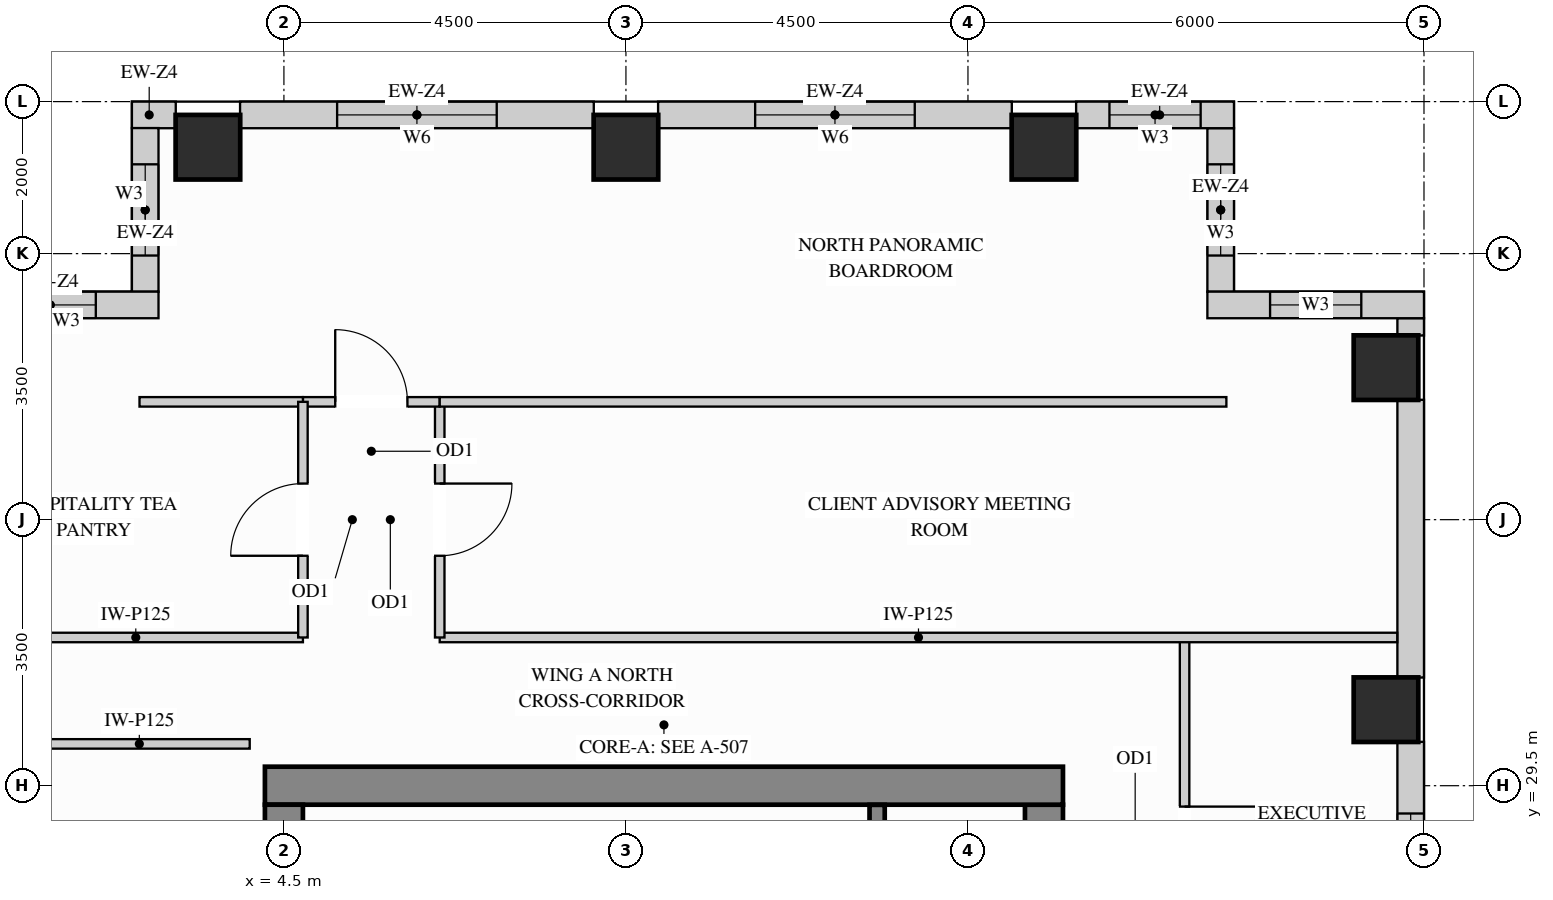
"""IFC4 building model, lengths in metres.
Left out: names, types, materials, properties, quantities, classifications, styles, units other than length and angle.
Written with IfcOpenShell. Run it as: python <this file> out.ifc"""

import sys

from ifc_helpers import new_model, si_unit, direction, frame, frame_2d, origin, origin_2d, place, context, subcontext, project, spatial, rectangle, extrude, source, transform, mapped, element, fill, save


model = new_model("IFC4")
c1 = context("Model", 3, precision=1e-05, world=origin(), true_north=direction((0.0, 1.0)))
c2 = subcontext(c1, "Body", "Model", "MODEL_VIEW")
j1 = project(units=[si_unit("LENGTHUNIT", "METRE"), si_unit("PLANEANGLEUNIT", "RADIAN")], contexts=[c1])
p1 = place(None, origin())
s1 = spatial("IfcSite", under=j1, at=p1, CompositionType="ELEMENT")
p2 = place(p1, origin())
s2 = spatial("IfcBuilding", under=s1, at=p2, CompositionType="ELEMENT")
p3 = place(p2, frame((0.0, 0.0, 262.8)))
s3 = spatial("IfcBuildingStorey", under=s2, at=p3, CompositionType="ELEMENT", Elevation=262.8)
m1 = source(origin(), c2, "Body", "SweptSolid", [
    extrude(rectangle(XDim=0.85, YDim=0.85, at=origin_2d()), origin(), (0.0, 0.0, 1.0), 3.4),
])
for number, where, z_axis, x_axis in (
    (1, (19.0, 30.5, 0.0), (0.0, 0.0, 1.0), (1.0, 0.0, 0.0)),
    (2, (19.0, 35.0, 0.0), (0.0, 0.0, 1.0), (1.0, 0.0, 0.0)),
    (3, (14.5, 37.9, 0.0), (0.0, 0.0, 1.0), (1.0, 0.0, 0.0)),
    (4, (3.5, 37.9, 0.0), (0.0, 0.0, 1.0), (1.0, 0.0, 0.0)),
    (5, (9.0, 37.9, 0.0), (0.0, 0.0, 1.0), (1.0, 0.0, 0.0)),
):
    element("IfcColumn", number, at=place(p3, frame(where, z_axis=z_axis, x_axis=x_axis)), inside=s3, PredefinedType="COLUMN", context=c2, shape_type="MappedRepresentation", body=[
        mapped(m1, transform((0.0, 0.0, 0.0), x_axis=(1.0, 0.0, 0.0), y_axis=(0.0, 1.0, 0.0), z_axis=(0.0, 0.0, 1.0))),
    ])
m2 = source(origin(), c2, "Body", "SweptSolid", [
    extrude(rectangle(XDim=8.37, YDim=0.5, at=frame_2d((4.185, 0.0))), origin(), (0.0, 0.0, 1.0), 3.4),
])
p4 = place(p3, frame((14.5, 20.88, 0.0), z_axis=(0.0, 0.0, 1.0), x_axis=(0.0, 1.0, 0.0)))
e6 = element("IfcWall", 6, at=p4, inside=s3, PredefinedType="SHEAR", context=c2, shape_type="MappedRepresentation", body=[
    mapped(m2, transform((0.0, 0.0, 0.0), x_axis=(1.0, 0.0, 0.0), y_axis=(0.0, 1.0, 0.0), z_axis=(0.0, 0.0, 1.0))),
])
m3 = source(origin(), c2, "Body", "SweptSolid", [
    extrude(rectangle(XDim=10.5, YDim=0.5, at=frame_2d((5.25, 0.0))), origin(), (0.0, 0.0, 1.0), 3.4),
])
p5 = place(p3, frame((4.25, 29.5, 0.0), z_axis=(0.0, 0.0, 1.0), x_axis=(1.0, 0.0, 0.0)))
e7 = element("IfcWall", 7, at=p5, inside=s3, PredefinedType="SHEAR", context=c2, shape_type="MappedRepresentation", body=[
    mapped(m3, transform((0.0, 0.0, 0.0), x_axis=(1.0, 0.0, 0.0), y_axis=(0.0, 1.0, 0.0), z_axis=(0.0, 0.0, 1.0))),
])
m4 = source(origin(), c2, "Body", "SweptSolid", [
    extrude(rectangle(XDim=20.5, YDim=0.5, at=frame_2d((10.25, 0.0))), origin(), (0.0, 0.0, 1.0), 3.4),
])
p6 = place(p3, frame((4.5, 8.75, 0.0), z_axis=(0.0, 0.0, 1.0), x_axis=(0.0, 1.0, 0.0)))
e8 = element("IfcWall", 8, at=p6, inside=s3, PredefinedType="SHEAR", context=c2, shape_type="MappedRepresentation", body=[
    mapped(m4, transform((0.0, 0.0, 0.0), x_axis=(1.0, 0.0, 0.0), y_axis=(0.0, 1.0, 0.0), z_axis=(0.0, 0.0, 1.0))),
])
p7 = place(p3, frame((16.825, 35.998, 0.0), z_axis=(0.0, 0.0, 1.0), x_axis=(0.0, 1.0, 0.0)))
e9 = element("IfcWall", 9, at=p7, inside=s3, PredefinedType="SOLIDWALL", context=c2, shape_type="SweptSolid", body=[
    extrude(rectangle(XDim=2.154, YDim=0.35, at=frame_2d((1.077, 0.0))), origin(), (0.0, 0.0, 1.0), 3.385),
])
p8 = place(p7, frame((0.477, 0.0, 0.78)))
e10 = element("IfcOpeningElement", 10, at=p8, cuts=e9, PredefinedType="OPENING", context=c2, shape_type="SweptSolid", body=[
    extrude(rectangle(XDim=1.2, YDim=2.25, at=frame_2d((0.6, 1.125))), frame((0.0, 0.185, 0.0), z_axis=(0.0, -1.0, 0.0), x_axis=(1.0, 0.0, 0.0)), (0.0, 0.0, 1.0), 0.37),
])
p9 = place(p3, frame((17.0, 38.325, 0.0), z_axis=(0.0, 0.0, 1.0), x_axis=(-1.0, 0.0, 0.0)))
e11 = element("IfcWall", 11, at=p9, inside=s3, PredefinedType="SOLIDWALL", context=c2, shape_type="SweptSolid", body=[
    extrude(rectangle(XDim=2.077, YDim=0.35, at=frame_2d((1.039, 0.0))), origin(), (0.0, 0.0, 1.0), 3.385),
])
p10 = place(p9, frame((0.438, 0.0, 0.78)))
e12 = element("IfcOpeningElement", 12, at=p10, cuts=e11, PredefinedType="OPENING", context=c2, shape_type="SweptSolid", body=[
    extrude(rectangle(XDim=1.2, YDim=2.25, at=frame_2d((0.6, 1.125))), frame((0.0, 0.185, 0.0), z_axis=(0.0, -1.0, 0.0), x_axis=(1.0, 0.0, 0.0)), (0.0, 0.0, 1.0), 0.37),
])
p11 = place(p3, frame((14.077, 38.325, 0.0), z_axis=(0.0, 0.0, 1.0), x_axis=(-1.0, 0.0, 0.0)))
e13 = element("IfcWall", 13, at=p11, inside=s3, PredefinedType="SOLIDWALL", context=c2, shape_type="SweptSolid", body=[
    extrude(rectangle(XDim=4.654, YDim=0.35, at=frame_2d((2.327, 0.0))), origin(), (0.0, 0.0, 1.0), 3.385),
])
p12 = place(p11, frame((1.277, 0.0, 0.78)))
e14 = element("IfcOpeningElement", 14, at=p12, cuts=e13, PredefinedType="OPENING", context=c2, shape_type="SweptSolid", body=[
    extrude(rectangle(XDim=2.1, YDim=2.25, at=frame_2d((1.05, 1.125))), frame((0.0, 0.185, 0.0), z_axis=(0.0, -1.0, 0.0), x_axis=(1.0, 0.0, 0.0)), (0.0, 0.0, 1.0), 0.37),
])
p13 = place(p3, frame((8.577, 38.325, 0.0), z_axis=(0.0, 0.0, 1.0), x_axis=(-1.0, 0.0, 0.0)))
e15 = element("IfcWall", 15, at=p13, inside=s3, PredefinedType="SOLIDWALL", context=c2, shape_type="SweptSolid", body=[
    extrude(rectangle(XDim=4.654, YDim=0.35, at=frame_2d((2.327, 0.0))), origin(), (0.0, 0.0, 1.0), 3.385),
])
p14 = place(p13, frame((1.277, 0.0, 0.78)))
e16 = element("IfcOpeningElement", 16, at=p14, cuts=e15, PredefinedType="OPENING", context=c2, shape_type="SweptSolid", body=[
    extrude(rectangle(XDim=2.1, YDim=2.25, at=frame_2d((1.05, 1.125))), frame((0.0, 0.185, 0.0), z_axis=(0.0, -1.0, 0.0), x_axis=(1.0, 0.0, 0.0)), (0.0, 0.0, 1.0), 0.37),
])
m5 = source(origin(), c2, "Body", "SweptSolid", [
    extrude(rectangle(XDim=0.577, YDim=0.35, at=frame_2d((0.289, 0.0))), origin(), (0.0, 0.0, 1.0), 3.385),
])
p15 = place(p3, frame((3.077, 38.325, 0.0), z_axis=(0.0, 0.0, 1.0), x_axis=(-1.0, 0.0, 0.0)))
e17 = element("IfcWall", 17, at=p15, inside=s3, PredefinedType="SOLIDWALL", context=c2, shape_type="MappedRepresentation", body=[
    mapped(m5, transform((0.0, 0.0, 0.0), x_axis=(1.0, 0.0, 0.0), y_axis=(0.0, 1.0, 0.0), z_axis=(0.0, 0.0, 1.0))),
])
p16 = place(p3, frame((2.675, 38.152, 0.0), z_axis=(0.0, 0.0, 1.0), x_axis=(0.0, -1.0, 0.0)))
e18 = element("IfcWall", 18, at=p16, inside=s3, PredefinedType="SOLIDWALL", context=c2, shape_type="SweptSolid", body=[
    extrude(rectangle(XDim=2.154, YDim=0.35, at=frame_2d((1.077, 0.0))), origin(), (0.0, 0.0, 1.0), 3.385),
])
p17 = place(p16, frame((0.477, 0.0, 0.78)))
e19 = element("IfcOpeningElement", 19, at=p17, cuts=e18, PredefinedType="OPENING", context=c2, shape_type="SweptSolid", body=[
    extrude(rectangle(XDim=1.2, YDim=2.25, at=frame_2d((0.6, 1.125))), frame((0.0, 0.185, 0.0), z_axis=(0.0, -1.0, 0.0), x_axis=(1.0, 0.0, 0.0)), (0.0, 0.0, 1.0), 0.37),
])
p18 = place(p3, frame((2.85, 35.825, 0.0), z_axis=(0.0, 0.0, 1.0), x_axis=(-1.0, 0.0, 0.0)))
e20 = element("IfcWall", 20, at=p18, inside=s3, PredefinedType="SOLIDWALL", context=c2, shape_type="SweptSolid", body=[
    extrude(rectangle(XDim=2.85, YDim=0.35, at=frame_2d((1.425, 0.0))), origin(), (0.0, 0.0, 1.0), 3.385),
])
p19 = place(p18, frame((0.825, 0.0, 0.78)))
e21 = element("IfcOpeningElement", 21, at=p19, cuts=e20, PredefinedType="OPENING", context=c2, shape_type="SweptSolid", body=[
    extrude(rectangle(XDim=1.2, YDim=2.25, at=frame_2d((0.6, 1.125))), frame((0.0, 0.185, 0.0), z_axis=(0.0, -1.0, 0.0), x_axis=(1.0, 0.0, 0.0)), (0.0, 0.0, 1.0), 0.37),
])
p20 = place(p3, frame((19.325, 27.223, 0.0), z_axis=(0.0, 0.0, 1.0), x_axis=(0.0, 1.0, 0.0)))
e22 = element("IfcWall", 22, at=p20, inside=s3, PredefinedType="SOLIDWALL", context=c2, shape_type="SweptSolid", body=[
    extrude(rectangle(XDim=2.854, YDim=0.35, at=frame_2d((1.427, 0.0))), origin(), (0.0, 0.0, 1.0), 2.619),
])
p21 = place(p20, frame((0.411, 0.0, 0.78)))
e23 = element("IfcOpeningElement", 23, at=p21, cuts=e22, PredefinedType="OPENING", context=c2, shape_type="SweptSolid", body=[
    extrude(rectangle(XDim=1.5, YDim=1.659, at=frame_2d((0.75, 0.83))), frame((0.0, 0.185, 0.0), z_axis=(0.0, -1.0, 0.0), x_axis=(1.0, 0.0, 0.0)), (0.0, 0.0, 1.0), 0.37),
])
m6 = source(origin(), c2, "Body", "SweptSolid", [
    extrude(rectangle(XDim=3.654, YDim=0.35, at=frame_2d((1.827, 0.0))), origin(), (0.0, 0.0, 1.0), 2.619),
])
p22 = place(p3, frame((19.325, 30.923, 0.0), z_axis=(0.0, 0.0, 1.0), x_axis=(0.0, 1.0, 0.0)))
e24 = element("IfcWall", 24, at=p22, inside=s3, PredefinedType="SOLIDWALL", context=c2, shape_type="MappedRepresentation", body=[
    mapped(m6, transform((0.0, 0.0, 0.0), x_axis=(1.0, 0.0, 0.0), y_axis=(0.0, 1.0, 0.0), z_axis=(0.0, 0.0, 1.0))),
])
m7 = source(origin(), c2, "Body", "SweptSolid", [
    extrude(rectangle(XDim=0.229, YDim=0.35, at=frame_2d((0.115, 0.0))), origin(), (0.0, 0.0, 1.0), 3.385),
])
p23 = place(p3, frame((19.325, 35.423, 0.0), z_axis=(0.0, 0.0, 1.0), x_axis=(0.0, 1.0, 0.0)))
e25 = element("IfcWall", 25, at=p23, inside=s3, PredefinedType="SOLIDWALL", context=c2, shape_type="MappedRepresentation", body=[
    mapped(m7, transform((0.0, 0.0, 0.0), x_axis=(1.0, 0.0, 0.0), y_axis=(0.0, 1.0, 0.0), z_axis=(0.0, 0.0, 1.0))),
])
p24 = place(p3, frame((19.5, 35.825, 0.0), z_axis=(0.0, 0.0, 1.0), x_axis=(-1.0, 0.0, 0.0)))
e26 = element("IfcWall", 26, at=p24, inside=s3, PredefinedType="SOLIDWALL", context=c2, shape_type="SweptSolid", body=[
    extrude(rectangle(XDim=2.85, YDim=0.35, at=frame_2d((1.425, 0.0))), origin(), (0.0, 0.0, 1.0), 3.385),
])
p25 = place(p24, frame((0.825, 0.0, 0.78)))
e27 = element("IfcOpeningElement", 27, at=p25, cuts=e26, PredefinedType="OPENING", context=c2, shape_type="SweptSolid", body=[
    extrude(rectangle(XDim=1.2, YDim=2.25, at=frame_2d((0.6, 1.125))), frame((0.0, 0.185, 0.0), z_axis=(0.0, -1.0, 0.0), x_axis=(1.0, 0.0, 0.0)), (0.0, 0.0, 1.0), 0.37),
])
p26 = place(p3, frame((16.35, 26.05, 0.0), z_axis=(0.0, 0.0, 1.0), x_axis=(0.0, 1.0, 0.0)))
e28 = element("IfcWall", 28, at=p26, inside=s3, PredefinedType="PARTITIONING", context=c2, shape_type="SweptSolid", body=[
    extrude(rectangle(XDim=5.4, YDim=0.125, at=frame_2d((2.7, 0.0))), origin(), (0.0, 0.0, 1.0), 3.385),
])
p27 = place(p26, frame((2.225, 0.0, 0.0)))
e29 = element("IfcOpeningElement", 29, at=p27, cuts=e28, PredefinedType="OPENING", context=c2, shape_type="SweptSolid", body=[
    extrude(rectangle(XDim=0.95, YDim=2.15, at=frame_2d((0.475, 1.075))), frame((0.0, 0.073, 0.0), z_axis=(0.0, -1.0, 0.0), x_axis=(1.0, 0.0, 0.0)), (0.0, 0.0, 1.0), 0.145),
])
m8 = source(origin(), c2, "Body", "SweptSolid", [
    extrude(rectangle(XDim=12.598, YDim=0.125, at=frame_2d((6.299, 0.0))), origin(), (0.0, 0.0, 1.0), 3.385),
])
p28 = place(p3, frame((6.55, 31.45, 0.0), z_axis=(0.0, 0.0, 1.0), x_axis=(1.0, 0.0, 0.0)))
e30 = element("IfcWall", 30, at=p28, inside=s3, PredefinedType="PARTITIONING", context=c2, shape_type="MappedRepresentation", body=[
    mapped(m8, transform((0.0, 0.0, 0.0), x_axis=(1.0, 0.0, 0.0), y_axis=(0.0, 1.0, 0.0), z_axis=(0.0, 0.0, 1.0))),
])
m9 = source(origin(), c2, "Body", "SweptSolid", [
    extrude(rectangle(XDim=4.398, YDim=0.125, at=frame_2d((2.199, 0.0))), origin(), (0.0, 0.0, 1.0), 3.385),
])
p29 = place(p3, frame((0.352, 31.45, 0.0), z_axis=(0.0, 0.0, 1.0), x_axis=(1.0, 0.0, 0.0)))
e31 = element("IfcWall", 31, at=p29, inside=s3, PredefinedType="PARTITIONING", context=c2, shape_type="MappedRepresentation", body=[
    mapped(m9, transform((0.0, 0.0, 0.0), x_axis=(1.0, 0.0, 0.0), y_axis=(0.0, 1.0, 0.0), z_axis=(0.0, 0.0, 1.0))),
])
m10 = source(origin(), c2, "Body", "SweptSolid", [
    extrude(rectangle(XDim=3.0, YDim=0.125, at=frame_2d((1.5, 0.0))), origin(), (0.0, 0.0, 1.0), 3.385),
])
p30 = place(p3, frame((1.05, 30.05, 0.0), z_axis=(0.0, 0.0, 1.0), x_axis=(1.0, 0.0, 0.0)))
e32 = element("IfcWall", 32, at=p30, inside=s3, PredefinedType="PARTITIONING", context=c2, shape_type="MappedRepresentation", body=[
    mapped(m10, transform((0.0, 0.0, 0.0), x_axis=(1.0, 0.0, 0.0), y_axis=(0.0, 1.0, 0.0), z_axis=(0.0, 0.0, 1.0))),
])
p31 = place(p3, frame((6.55, 31.45, 0.0), z_axis=(0.0, 0.0, 1.0), x_axis=(0.0, 1.0, 0.0)))
e33 = element("IfcWall", 33, at=p31, inside=s3, PredefinedType="PARTITIONING", context=c2, shape_type="SweptSolid", body=[
    extrude(rectangle(XDim=3.1, YDim=0.125, at=frame_2d((1.55, 0.0))), origin(), (0.0, 0.0, 1.0), 3.385),
])
p32 = place(p31, frame((1.075, 0.0, 0.0)))
e34 = element("IfcOpeningElement", 34, at=p32, cuts=e33, PredefinedType="OPENING", context=c2, shape_type="SweptSolid", body=[
    extrude(rectangle(XDim=0.95, YDim=2.15, at=frame_2d((0.475, 1.075))), frame((0.0, 0.073, 0.0), z_axis=(0.0, -1.0, 0.0), x_axis=(1.0, 0.0, 0.0)), (0.0, 0.0, 1.0), 0.145),
])
p33 = place(p3, frame((4.75, 34.55, 0.0), z_axis=(0.0, 0.0, 1.0), x_axis=(1.0, 0.0, 0.0)))
e35 = element("IfcWall", 35, at=p33, inside=s3, PredefinedType="PARTITIONING", context=c2, shape_type="SweptSolid", body=[
    extrude(rectangle(XDim=1.8, YDim=0.125, at=frame_2d((0.9, 0.0))), origin(), (0.0, 0.0, 1.0), 3.385),
])
p34 = place(p33, frame((0.425, 0.0, 0.0)))
e36 = element("IfcOpeningElement", 36, at=p34, cuts=e35, PredefinedType="OPENING", context=c2, shape_type="SweptSolid", body=[
    extrude(rectangle(XDim=0.95, YDim=2.15, at=frame_2d((0.475, 1.075))), frame((0.0, 0.073, 0.0), z_axis=(0.0, -1.0, 0.0), x_axis=(1.0, 0.0, 0.0)), (0.0, 0.0, 1.0), 0.145),
])
m11 = source(origin(), c2, "Body", "SweptSolid", [
    extrude(rectangle(XDim=10.35, YDim=0.125, at=frame_2d((5.175, 0.0))), origin(), (0.0, 0.0, 1.0), 3.385),
])
p35 = place(p3, frame((6.55, 34.55, 0.0), z_axis=(0.0, 0.0, 1.0), x_axis=(1.0, 0.0, 0.0)))
e37 = element("IfcWall", 37, at=p35, inside=s3, PredefinedType="PARTITIONING", context=c2, shape_type="MappedRepresentation", body=[
    mapped(m11, transform((0.0, 0.0, 0.0), x_axis=(1.0, 0.0, 0.0), y_axis=(0.0, 1.0, 0.0), z_axis=(0.0, 0.0, 1.0))),
])
m12 = source(origin(), c2, "Body", "SweptSolid", [
    extrude(rectangle(XDim=2.15, YDim=0.125, at=frame_2d((1.075, 0.0))), origin(), (0.0, 0.0, 1.0), 3.385),
])
p36 = place(p3, frame((2.6, 34.55, 0.0), z_axis=(0.0, 0.0, 1.0), x_axis=(1.0, 0.0, 0.0)))
e38 = element("IfcWall", 38, at=p36, inside=s3, PredefinedType="PARTITIONING", context=c2, shape_type="MappedRepresentation", body=[
    mapped(m12, transform((0.0, 0.0, 0.0), x_axis=(1.0, 0.0, 0.0), y_axis=(0.0, 1.0, 0.0), z_axis=(0.0, 0.0, 1.0))),
])
p37 = place(p3, frame((4.75, 31.45, 0.0), z_axis=(0.0, 0.0, 1.0), x_axis=(0.0, 1.0, 0.0)))
e39 = element("IfcWall", 39, at=p37, inside=s3, PredefinedType="PARTITIONING", context=c2, shape_type="SweptSolid", body=[
    extrude(rectangle(XDim=3.1, YDim=0.125, at=frame_2d((1.55, 0.0))), origin(), (0.0, 0.0, 1.0), 3.385),
])
p38 = place(p37, frame((1.075, 0.0, 0.0)))
e40 = element("IfcOpeningElement", 40, at=p38, cuts=e39, PredefinedType="OPENING", context=c2, shape_type="SweptSolid", body=[
    extrude(rectangle(XDim=0.95, YDim=2.15, at=frame_2d((0.475, 1.075))), frame((0.0, 0.073, 0.0), z_axis=(0.0, -1.0, 0.0), x_axis=(1.0, 0.0, 0.0)), (0.0, 0.0, 1.0), 0.145),
])
m13 = source(origin(), c2, "Body", "SweptSolid", [
    extrude(rectangle(XDim=3.803, YDim=0.2, at=frame_2d((1.901, 0.0))), origin(), (0.0, 0.0, 1.0), 3.4),
])
p39 = place(p3, frame((12.305, 25.445, 0.0), z_axis=(0.0, 0.0, 1.0), x_axis=(0.0, 1.0, 0.0)))
e41 = element("IfcWall", 41, at=p39, inside=s3, PredefinedType="SHEAR", context=c2, shape_type="MappedRepresentation", body=[
    mapped(m13, transform((0.0, 0.0, 0.0), x_axis=(1.0, 0.0, 0.0), y_axis=(0.0, 1.0, 0.0), z_axis=(0.0, 0.0, 1.0))),
])
m14 = source(origin(), c2, "Body", "SweptSolid", [
    extrude(rectangle(XDim=0.95, YDim=2.15, at=frame_2d((0.475, 1.075))), frame((0.0, 0.025, 0.0), z_axis=(0.0, -1.0, 0.0), x_axis=(1.0, 0.0, 0.0)), (0.0, 0.0, 1.0), 0.05),
])
p40 = place(p27, origin())
e42 = element("IfcDoor", 42, at=p40, inside=s3, OperationType="SINGLE_SWING_RIGHT", PredefinedType="DOOR", context=c2, shape_type="MappedRepresentation", body=[
    mapped(m14, transform((0.0, 0.0, 0.0), x_axis=(1.0, 0.0, 0.0), y_axis=(0.0, 1.0, 0.0), z_axis=(0.0, 0.0, 1.0))),
])
fill(e29, e42)
p41 = place(p32, origin())
e43 = element("IfcDoor", 43, at=p41, inside=s3, OperationType="SINGLE_SWING_RIGHT", PredefinedType="DOOR", context=c2, shape_type="MappedRepresentation", body=[
    mapped(m14, transform((0.0, 0.0, 0.0), x_axis=(1.0, 0.0, 0.0), y_axis=(0.0, 1.0, 0.0), z_axis=(0.0, 0.0, 1.0))),
])
fill(e34, e43)
p42 = place(p34, origin())
e44 = element("IfcDoor", 44, at=p42, inside=s3, OperationType="SINGLE_SWING_LEFT", PredefinedType="DOOR", context=c2, shape_type="MappedRepresentation", body=[
    mapped(m14, transform((0.0, 0.0, 0.0), x_axis=(1.0, 0.0, 0.0), y_axis=(0.0, 1.0, 0.0), z_axis=(0.0, 0.0, 1.0))),
])
fill(e36, e44)
p43 = place(p38, origin())
e45 = element("IfcDoor", 45, at=p43, inside=s3, OperationType="SINGLE_SWING_LEFT", PredefinedType="DOOR", context=c2, shape_type="MappedRepresentation", body=[
    mapped(m14, transform((0.0, 0.0, 0.0), x_axis=(1.0, 0.0, 0.0), y_axis=(0.0, 1.0, 0.0), z_axis=(0.0, 0.0, 1.0))),
])
fill(e40, e45)
m15 = source(origin(), c2, "Body", "SweptSolid", [
    extrude(rectangle(XDim=1.2, YDim=2.25, at=frame_2d((0.6, 1.125))), frame((0.0, 0.03, 0.0), z_axis=(0.0, -1.0, 0.0), x_axis=(1.0, 0.0, 0.0)), (0.0, 0.0, 1.0), 0.06),
])
p44 = place(p8, origin())
e46 = element("IfcWindow", 46, at=p44, inside=s3, PartitioningType="SINGLE_PANEL", PredefinedType="WINDOW", context=c2, shape_type="MappedRepresentation", body=[
    mapped(m15, transform((0.0, 0.0, 0.0), x_axis=(1.0, 0.0, 0.0), y_axis=(0.0, 1.0, 0.0), z_axis=(0.0, 0.0, 1.0))),
])
fill(e10, e46)
p45 = place(p10, origin())
e47 = element("IfcWindow", 47, at=p45, inside=s3, PartitioningType="SINGLE_PANEL", PredefinedType="WINDOW", context=c2, shape_type="MappedRepresentation", body=[
    mapped(m15, transform((0.0, 0.0, 0.0), x_axis=(1.0, 0.0, 0.0), y_axis=(0.0, 1.0, 0.0), z_axis=(0.0, 0.0, 1.0))),
])
fill(e12, e47)
p46 = place(p17, origin())
e48 = element("IfcWindow", 48, at=p46, inside=s3, PartitioningType="SINGLE_PANEL", PredefinedType="WINDOW", context=c2, shape_type="MappedRepresentation", body=[
    mapped(m15, transform((0.0, 0.0, 0.0), x_axis=(1.0, 0.0, 0.0), y_axis=(0.0, 1.0, 0.0), z_axis=(0.0, 0.0, 1.0))),
])
fill(e19, e48)
p47 = place(p19, origin())
e49 = element("IfcWindow", 49, at=p47, inside=s3, PartitioningType="SINGLE_PANEL", PredefinedType="WINDOW", context=c2, shape_type="MappedRepresentation", body=[
    mapped(m15, transform((0.0, 0.0, 0.0), x_axis=(1.0, 0.0, 0.0), y_axis=(0.0, 1.0, 0.0), z_axis=(0.0, 0.0, 1.0))),
])
fill(e21, e49)
p48 = place(p25, origin())
e50 = element("IfcWindow", 50, at=p48, inside=s3, PartitioningType="SINGLE_PANEL", PredefinedType="WINDOW", context=c2, shape_type="MappedRepresentation", body=[
    mapped(m15, transform((0.0, 0.0, 0.0), x_axis=(1.0, 0.0, 0.0), y_axis=(0.0, 1.0, 0.0), z_axis=(0.0, 0.0, 1.0))),
])
fill(e27, e50)
m16 = source(origin(), c2, "Body", "SweptSolid", [
    extrude(rectangle(XDim=1.5, YDim=1.659, at=frame_2d((0.75, 0.83))), frame((0.0, 0.03, 0.0), z_axis=(0.0, -1.0, 0.0), x_axis=(1.0, 0.0, 0.0)), (0.0, 0.0, 1.0), 0.06),
])
p49 = place(p21, origin())
e51 = element("IfcWindow", 51, at=p49, inside=s3, PartitioningType="SINGLE_PANEL", PredefinedType="WINDOW", context=c2, shape_type="MappedRepresentation", body=[
    mapped(m16, transform((0.0, 0.0, 0.0), x_axis=(1.0, 0.0, 0.0), y_axis=(0.0, 1.0, 0.0), z_axis=(0.0, 0.0, 1.0))),
])
fill(e23, e51)
m17 = source(origin(), c2, "Body", "SweptSolid", [
    extrude(rectangle(XDim=2.1, YDim=2.25, at=frame_2d((1.05, 1.125))), frame((0.0, 0.03, 0.0), z_axis=(0.0, -1.0, 0.0), x_axis=(1.0, 0.0, 0.0)), (0.0, 0.0, 1.0), 0.06),
])
p50 = place(p12, origin())
e52 = element("IfcWindow", 52, at=p50, inside=s3, PartitioningType="SINGLE_PANEL", PredefinedType="WINDOW", context=c2, shape_type="MappedRepresentation", body=[
    mapped(m17, transform((0.0, 0.0, 0.0), x_axis=(1.0, 0.0, 0.0), y_axis=(0.0, 1.0, 0.0), z_axis=(0.0, 0.0, 1.0))),
])
fill(e14, e52)
p51 = place(p14, origin())
e53 = element("IfcWindow", 53, at=p51, inside=s3, PartitioningType="SINGLE_PANEL", PredefinedType="WINDOW", context=c2, shape_type="MappedRepresentation", body=[
    mapped(m17, transform((0.0, 0.0, 0.0), x_axis=(1.0, 0.0, 0.0), y_axis=(0.0, 1.0, 0.0), z_axis=(0.0, 0.0, 1.0))),
])
fill(e16, e53)
save(model, sys.argv[1])
